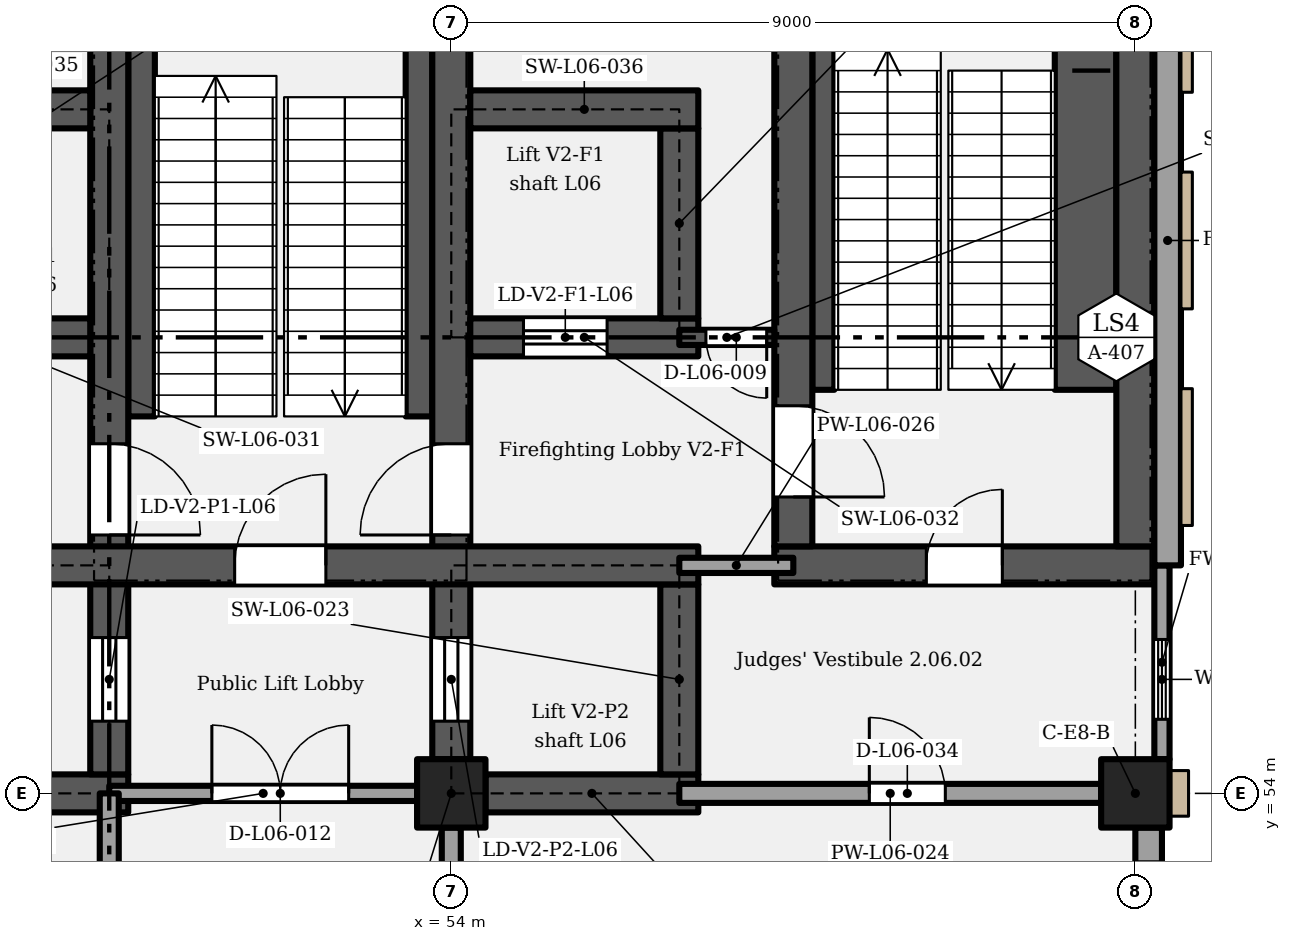
"""IFC4 building model, lengths in metres.
Left out: names, types, materials, properties, quantities, classifications, styles, units other than length and angle.
Written with IfcOpenShell. Run it as: python <this file> out.ifc"""

import sys

from ifc_helpers import new_model, si_unit, direction, frame, frame_2d, origin, origin_2d, place, context, subcontext, project, spatial, rectangle, extrude, element, fill, save


model = new_model("IFC4")
c1 = context("Model", 3, precision=1e-05, world=origin(), true_north=direction((0.0, 1.0)))
c2 = subcontext(c1, "Body", "Model", "MODEL_VIEW")
j1 = project(units=[si_unit("LENGTHUNIT", "METRE"), si_unit("PLANEANGLEUNIT", "RADIAN")], contexts=[c1])
p1 = place(None, origin())
s1 = spatial("IfcSite", under=j1, at=p1, CompositionType="ELEMENT")
p2 = place(p1, origin())
s2 = spatial("IfcBuilding", under=s1, at=p2, CompositionType="ELEMENT")
p3 = place(p2, frame((0.0, 0.0, 33.6)))
s3 = spatial("IfcBuildingStorey", under=s2, at=p3, CompositionType="ELEMENT", Elevation=33.6)
for number, where, z_axis, x_axis in (
    (1, (54.0, 54.0, 0.0), (0.0, 0.0, 1.0), (1.0, 0.0, 0.0)),
    (2, (63.0, 54.0, 0.0), (0.0, 0.0, 1.0), (1.0, 0.0, 0.0)),
):
    element("IfcColumn", number, at=place(p3, frame(where, z_axis=z_axis, x_axis=x_axis)), inside=s3, PredefinedType="COLUMN", context=c2, shape_type="SweptSolid", body=[
        extrude(rectangle(XDim=0.9, YDim=0.9, at=origin_2d()), origin(), (0.0, 0.0, 1.0), 5.4),
    ])
p4 = place(p3, frame((46.25, 54.0, 0.0), z_axis=(0.0, 0.0, 1.0), x_axis=(1.0, 0.0, 0.0)))
e3 = element("IfcWall", 3, at=p4, inside=s3, PredefinedType="SHEAR", context=c2, shape_type="SweptSolid", body=[
    extrude(rectangle(XDim=3.5, YDim=0.5, at=frame_2d((1.75, 0.0))), origin(), (0.0, 0.0, 1.0), 5.15),
])
p5 = place(p3, frame((54.45, 54.0, 0.0), z_axis=(0.0, 0.0, 1.0), x_axis=(1.0, 0.0, 0.0)))
e4 = element("IfcWall", 4, at=p5, inside=s3, PredefinedType="SHEAR", context=c2, shape_type="SweptSolid", body=[
    extrude(rectangle(XDim=2.8, YDim=0.5, at=frame_2d((1.4, 0.0))), origin(), (0.0, 0.0, 1.0), 5.15),
])
p6 = place(p3, frame((49.5, 54.25, 0.0), z_axis=(0.0, 0.0, 1.0), x_axis=(0.0, 1.0, 0.0)))
e5 = element("IfcWall", 5, at=p6, inside=s3, PredefinedType="SHEAR", context=c2, shape_type="SweptSolid", body=[
    extrude(rectangle(XDim=11.5, YDim=0.5, at=frame_2d((5.75, 0.0))), origin(), (0.0, 0.0, 1.0), 5.15),
])
p7 = place(p6, frame((0.7, 0.0, 0.0)))
e6 = element("IfcOpeningElement", 6, at=p7, cuts=e5, PredefinedType="OPENING", context=c2, shape_type="SweptSolid", body=[
    extrude(rectangle(XDim=1.1, YDim=2.1, at=frame_2d((0.55, 1.05))), frame((0.0, 0.26, 0.0), z_axis=(0.0, -1.0, 0.0), x_axis=(1.0, 0.0, 0.0)), (0.0, 0.0, 1.0), 0.52),
])
p8 = place(p6, frame((4.35, 0.0, 0.0), z_axis=(0.0, 0.0, 1.0), x_axis=(-1.0, 0.0, 0.0)))
e7 = element("IfcOpeningElement", 7, at=p8, cuts=e5, PredefinedType="OPENING", context=c2, shape_type="SweptSolid", body=[
    extrude(rectangle(XDim=1.2, YDim=2.1, at=frame_2d((0.6, 1.05))), frame((0.0, 0.26, 0.0), z_axis=(0.0, -1.0, 0.0), x_axis=(1.0, 0.0, 0.0)), (0.0, 0.0, 1.0), 0.52),
])
p9 = place(p3, frame((57.0, 54.25, 0.0), z_axis=(0.0, 0.0, 1.0), x_axis=(0.0, 1.0, 0.0)))
e8 = element("IfcWall", 8, at=p9, inside=s3, PredefinedType="SHEAR", context=c2, shape_type="SweptSolid", body=[
    extrude(rectangle(XDim=2.5, YDim=0.5, at=frame_2d((1.25, 0.0))), origin(), (0.0, 0.0, 1.0), 5.15),
])
p10 = place(p3, frame((54.0, 54.45, 0.0), z_axis=(0.0, 0.0, 1.0), x_axis=(0.0, 1.0, 0.0)))
e9 = element("IfcWall", 9, at=p10, inside=s3, PredefinedType="SHEAR", context=c2, shape_type="SweptSolid", body=[
    extrude(rectangle(XDim=11.1, YDim=0.5, at=frame_2d((5.55, 0.0))), origin(), (0.0, 0.0, 1.0), 5.15),
])
p11 = place(p10, frame((0.5, 0.0, 0.0)))
e10 = element("IfcOpeningElement", 10, at=p11, cuts=e9, PredefinedType="OPENING", context=c2, shape_type="SweptSolid", body=[
    extrude(rectangle(XDim=1.1, YDim=2.1, at=frame_2d((0.55, 1.05))), frame((0.0, 0.26, 0.0), z_axis=(0.0, -1.0, 0.0), x_axis=(1.0, 0.0, 0.0)), (0.0, 0.0, 1.0), 0.52),
])
p12 = place(p10, frame((2.95, 0.0, 0.0)))
e11 = element("IfcOpeningElement", 11, at=p12, cuts=e9, PredefinedType="OPENING", context=c2, shape_type="SweptSolid", body=[
    extrude(rectangle(XDim=1.2, YDim=2.1, at=frame_2d((0.6, 1.05))), frame((0.0, 0.26, 0.0), z_axis=(0.0, -1.0, 0.0), x_axis=(1.0, 0.0, 0.0)), (0.0, 0.0, 1.0), 0.52),
])
p13 = place(p3, frame((46.25, 57.0, 0.0), z_axis=(0.0, 0.0, 1.0), x_axis=(1.0, 0.0, 0.0)))
e12 = element("IfcWall", 12, at=p13, inside=s3, PredefinedType="SHEAR", context=c2, shape_type="SweptSolid", body=[
    extrude(rectangle(XDim=11.0, YDim=0.5, at=frame_2d((5.5, 0.0))), origin(), (0.0, 0.0, 1.0), 5.15),
])
p14 = place(p13, frame((4.9, 0.0, 0.0)))
e13 = element("IfcOpeningElement", 13, at=p14, cuts=e12, PredefinedType="OPENING", context=c2, shape_type="SweptSolid", body=[
    extrude(rectangle(XDim=1.2, YDim=2.1, at=frame_2d((0.6, 1.05))), frame((0.0, 0.26, 0.0), z_axis=(0.0, -1.0, 0.0), x_axis=(1.0, 0.0, 0.0)), (0.0, 0.0, 1.0), 0.52),
])
p15 = place(p3, frame((58.25, 57.0, 0.0), z_axis=(0.0, 0.0, 1.0), x_axis=(1.0, 0.0, 0.0)))
e14 = element("IfcWall", 14, at=p15, inside=s3, PredefinedType="SHEAR", context=c2, shape_type="SweptSolid", body=[
    extrude(rectangle(XDim=5.0, YDim=0.5, at=frame_2d((2.5, 0.0))), origin(), (0.0, 0.0, 1.0), 5.15),
])
p16 = place(p15, frame((2.0, 0.0, 0.0)))
e15 = element("IfcOpeningElement", 15, at=p16, cuts=e14, PredefinedType="OPENING", context=c2, shape_type="SweptSolid", body=[
    extrude(rectangle(XDim=1.0, YDim=2.1, at=frame_2d((0.5, 1.05))), frame((0.0, 0.26, 0.0), z_axis=(0.0, -1.0, 0.0), x_axis=(1.0, 0.0, 0.0)), (0.0, 0.0, 1.0), 0.52),
])
p17 = place(p3, frame((58.5, 57.25, 0.0), z_axis=(0.0, 0.0, 1.0), x_axis=(0.0, 1.0, 0.0)))
e16 = element("IfcWall", 16, at=p17, inside=s3, PredefinedType="SHEAR", context=c2, shape_type="SweptSolid", body=[
    extrude(rectangle(XDim=8.5, YDim=0.5, at=frame_2d((4.25, 0.0))), origin(), (0.0, 0.0, 1.0), 5.15),
])
p18 = place(p17, frame((1.85, 0.0, 0.0), z_axis=(0.0, 0.0, 1.0), x_axis=(-1.0, 0.0, 0.0)))
e17 = element("IfcOpeningElement", 17, at=p18, cuts=e16, PredefinedType="OPENING", context=c2, shape_type="SweptSolid", body=[
    extrude(rectangle(XDim=1.2, YDim=2.1, at=frame_2d((0.6, 1.05))), frame((0.0, 0.26, 0.0), z_axis=(0.0, -1.0, 0.0), x_axis=(1.0, 0.0, 0.0)), (0.0, 0.0, 1.0), 0.52),
])
p19 = place(p3, frame((63.0, 57.25, 0.0), z_axis=(0.0, 0.0, 1.0), x_axis=(0.0, 1.0, 0.0)))
e18 = element("IfcWall", 18, at=p19, inside=s3, PredefinedType="SHEAR", context=c2, shape_type="SweptSolid", body=[
    extrude(rectangle(XDim=8.3, YDim=0.5, at=frame_2d((4.15, 0.0))), origin(), (0.0, 0.0, 1.0), 5.15),
])
p20 = place(p3, frame((46.25, 60.0, 0.0), z_axis=(0.0, 0.0, 1.0), x_axis=(1.0, 0.0, 0.0)))
e19 = element("IfcWall", 19, at=p20, inside=s3, PredefinedType="SHEAR", context=c2, shape_type="SweptSolid", body=[
    extrude(rectangle(XDim=3.0, YDim=0.5, at=frame_2d((1.5, 0.0))), origin(), (0.0, 0.0, 1.0), 5.15),
])
p21 = place(p3, frame((54.25, 60.0, 0.0), z_axis=(0.0, 0.0, 1.0), x_axis=(1.0, 0.0, 0.0)))
e20 = element("IfcWall", 20, at=p21, inside=s3, PredefinedType="SHEAR", context=c2, shape_type="SweptSolid", body=[
    extrude(rectangle(XDim=3.0, YDim=0.5, at=frame_2d((1.5, 0.0))), origin(), (0.0, 0.0, 1.0), 5.15),
])
p22 = place(p21, frame((0.7, 0.0, 0.0)))
e21 = element("IfcOpeningElement", 21, at=p22, cuts=e20, PredefinedType="OPENING", context=c2, shape_type="SweptSolid", body=[
    extrude(rectangle(XDim=1.1, YDim=2.1, at=frame_2d((0.55, 1.05))), frame((0.0, 0.26, 0.0), z_axis=(0.0, -1.0, 0.0), x_axis=(1.0, 0.0, 0.0)), (0.0, 0.0, 1.0), 0.52),
])
p23 = place(p3, frame((57.0, 60.25, 0.0), z_axis=(0.0, 0.0, 1.0), x_axis=(0.0, 1.0, 0.0)))
e22 = element("IfcWall", 22, at=p23, inside=s3, PredefinedType="SHEAR", context=c2, shape_type="SweptSolid", body=[
    extrude(rectangle(XDim=2.5, YDim=0.5, at=frame_2d((1.25, 0.0))), origin(), (0.0, 0.0, 1.0), 5.15),
])
for number, where, z_axis, x_axis in (
    (23, (46.25, 63.0, 0.0), (0.0, 0.0, 1.0), (1.0, 0.0, 0.0)),
    (24, (54.25, 63.0, 0.0), (0.0, 0.0, 1.0), (1.0, 0.0, 0.0)),
):
    element("IfcWall", number, at=place(p3, frame(where, z_axis=z_axis, x_axis=x_axis)), inside=s3, PredefinedType="SHEAR", context=c2, shape_type="SweptSolid", body=[
        extrude(rectangle(XDim=3.0, YDim=0.5, at=frame_2d((1.5, 0.0))), origin(), (0.0, 0.0, 1.0), 5.15),
    ])
p24 = place(p3, frame((63.175, 42.0, 0.0), z_axis=(0.0, 0.0, 1.0), x_axis=(0.0, 1.0, 0.0)))
e25 = element("IfcWall", 25, at=p24, inside=s3, PredefinedType="SOLIDWALL", context=c2, shape_type="SweptSolid", body=[
    extrude(rectangle(XDim=11.55, YDim=0.35, at=frame_2d((5.775, 0.0))), origin(), (0.0, 0.0, 1.0), 5.15),
])
p25 = place(p24, frame((3.0, 0.0, 1.05)))
e26 = element("IfcOpeningElement", 26, at=p25, cuts=e25, PredefinedType="OPENING", context=c2, shape_type="SweptSolid", body=[
    extrude(rectangle(XDim=1.5, YDim=3.5, at=frame_2d((0.75, 1.75))), frame((0.0, 0.185, 0.0), z_axis=(0.0, -1.0, 0.0), x_axis=(1.0, 0.0, 0.0)), (0.0, 0.0, 1.0), 0.37),
])
p26 = place(p24, frame((6.3, 0.0, 1.05)))
e27 = element("IfcOpeningElement", 27, at=p26, cuts=e25, PredefinedType="OPENING", context=c2, shape_type="SweptSolid", body=[
    extrude(rectangle(XDim=1.5, YDim=3.5, at=frame_2d((0.75, 1.75))), frame((0.0, 0.185, 0.0), z_axis=(0.0, -1.0, 0.0), x_axis=(1.0, 0.0, 0.0)), (0.0, 0.0, 1.0), 0.37),
])
p27 = place(p24, frame((9.6, 0.0, 1.05)))
e28 = element("IfcOpeningElement", 28, at=p27, cuts=e25, PredefinedType="OPENING", context=c2, shape_type="SweptSolid", body=[
    extrude(rectangle(XDim=1.5, YDim=3.5, at=frame_2d((0.75, 1.75))), frame((0.0, 0.185, 0.0), z_axis=(0.0, -1.0, 0.0), x_axis=(1.0, 0.0, 0.0)), (0.0, 0.0, 1.0), 0.37),
])
p28 = place(p3, frame((63.35, 54.45, 0.0), z_axis=(0.0, 0.0, 1.0), x_axis=(0.0, 1.0, 0.0)))
e29 = element("IfcWall", 29, at=p28, inside=s3, PredefinedType="SOLIDWALL", context=c2, shape_type="SweptSolid", body=[
    extrude(rectangle(XDim=2.55, YDim=0.2, at=frame_2d((1.275, 0.0))), origin(), (0.0, 0.0, 1.0), 5.15),
])
p29 = place(p28, frame((0.525, 0.0, 1.05)))
e30 = element("IfcOpeningElement", 30, at=p29, cuts=e29, PredefinedType="OPENING", context=c2, shape_type="SweptSolid", body=[
    extrude(rectangle(XDim=1.05, YDim=2.4, at=frame_2d((0.525, 1.2))), frame((0.0, 0.11, 0.0), z_axis=(0.0, -1.0, 0.0), x_axis=(1.0, 0.0, 0.0)), (0.0, 0.0, 1.0), 0.22),
])
p30 = place(p3, frame((63.425, 57.0, 0.0), z_axis=(0.0, 0.0, 1.0), x_axis=(0.0, 1.0, 0.0)))
e31 = element("IfcWall", 31, at=p30, inside=s3, PredefinedType="SOLIDWALL", context=c2, shape_type="SweptSolid", body=[
    extrude(rectangle(XDim=8.55, YDim=0.35, at=frame_2d((4.275, 0.0))), origin(), (0.0, 0.0, 1.0), 5.15),
])
p31 = place(p3, frame((49.5, 54.0, 0.0), z_axis=(0.0, 0.0, 1.0), x_axis=(1.0, 0.0, 0.0)))
e32 = element("IfcWall", 32, at=p31, inside=s3, PredefinedType="PARTITIONING", context=c2, shape_type="SweptSolid", body=[
    extrude(rectangle(XDim=4.05, YDim=0.2, at=frame_2d((2.025, 0.0))), origin(), (0.0, 0.0, 1.0), 4.4),
])
p32 = place(p31, frame((1.35, 0.0, 0.0)))
e33 = element("IfcOpeningElement", 33, at=p32, cuts=e32, PredefinedType="OPENING", context=c2, shape_type="SweptSolid", body=[
    extrude(rectangle(XDim=1.8, YDim=2.1, at=frame_2d((0.9, 1.05))), frame((0.0, 0.11, 0.0), z_axis=(0.0, -1.0, 0.0), x_axis=(1.0, 0.0, 0.0)), (0.0, 0.0, 1.0), 0.22),
])
p33 = place(p3, frame((57.0, 54.0, 0.0), z_axis=(0.0, 0.0, 1.0), x_axis=(1.0, 0.0, 0.0)))
e34 = element("IfcWall", 34, at=p33, inside=s3, PredefinedType="PARTITIONING", context=c2, shape_type="SweptSolid", body=[
    extrude(rectangle(XDim=5.55, YDim=0.25, at=frame_2d((2.775, 0.0))), origin(), (0.0, 0.0, 1.0), 4.4),
])
p34 = place(p33, frame((2.5, 0.0, 0.0)))
e35 = element("IfcOpeningElement", 35, at=p34, cuts=e34, PredefinedType="OPENING", context=c2, shape_type="SweptSolid", body=[
    extrude(rectangle(XDim=1.0, YDim=2.1, at=frame_2d((0.5, 1.05))), frame((0.0, 0.135, 0.0), z_axis=(0.0, -1.0, 0.0), x_axis=(1.0, 0.0, 0.0)), (0.0, 0.0, 1.0), 0.27),
])
p35 = place(p3, frame((57.0, 57.0, 0.0), z_axis=(0.0, 0.0, 1.0), x_axis=(1.0, 0.0, 0.0)))
e36 = element("IfcWall", 36, at=p35, inside=s3, PredefinedType="PARTITIONING", context=c2, shape_type="SweptSolid", body=[
    extrude(rectangle(XDim=1.5, YDim=0.2, at=frame_2d((0.75, 0.0))), origin(), (0.0, 0.0, 1.0), 5.15),
])
p36 = place(p3, frame((57.0, 60.0, 0.0), z_axis=(0.0, 0.0, 1.0), x_axis=(1.0, 0.0, 0.0)))
e37 = element("IfcWall", 37, at=p36, inside=s3, PredefinedType="SHEAR", context=c2, shape_type="SweptSolid", body=[
    extrude(rectangle(XDim=1.25, YDim=0.2, at=frame_2d((0.625, 0.0))), origin(), (0.0, 0.0, 1.0), 5.15),
])
p37 = place(p36, frame((1.15, 0.0, 0.0), z_axis=(0.0, 0.0, 1.0), x_axis=(-1.0, 0.0, 0.0)))
e38 = element("IfcOpeningElement", 38, at=p37, cuts=e37, PredefinedType="OPENING", context=c2, shape_type="SweptSolid", body=[
    extrude(rectangle(XDim=0.8, YDim=2.0, at=frame_2d((0.4, 1.0))), frame((0.0, 0.11, 0.0), z_axis=(0.0, -1.0, 0.0), x_axis=(1.0, 0.0, 0.0)), (0.0, 0.0, 1.0), 0.22),
])
p38 = place(p3, frame((49.5, 43.5, 0.0), z_axis=(0.0, 0.0, 1.0), x_axis=(0.0, 1.0, 0.0)))
e39 = element("IfcWall", 39, at=p38, inside=s3, PredefinedType="PARTITIONING", context=c2, shape_type="SweptSolid", body=[
    extrude(rectangle(XDim=10.5, YDim=0.25, at=frame_2d((5.25, 0.0))), origin(), (0.0, 0.0, 1.0), 5.15),
])
p39 = place(p38, frame((0.6, 0.0, 0.0)))
e40 = element("IfcOpeningElement", 40, at=p39, cuts=e39, PredefinedType="OPENING", context=c2, shape_type="SweptSolid", body=[
    extrude(rectangle(XDim=1.8, YDim=2.4, at=frame_2d((0.9, 1.2))), frame((0.0, 0.135, 0.0), z_axis=(0.0, -1.0, 0.0), x_axis=(1.0, 0.0, 0.0)), (0.0, 0.0, 1.0), 0.27),
])
p40 = place(p38, frame((7.1, 0.0, 0.0)))
e41 = element("IfcOpeningElement", 41, at=p40, cuts=e39, PredefinedType="OPENING", context=c2, shape_type="SweptSolid", body=[
    extrude(rectangle(XDim=1.8, YDim=2.4, at=frame_2d((0.9, 1.2))), frame((0.0, 0.135, 0.0), z_axis=(0.0, -1.0, 0.0), x_axis=(1.0, 0.0, 0.0)), (0.0, 0.0, 1.0), 0.27),
])
p41 = place(p3, frame((54.0, 42.0, 0.0), z_axis=(0.0, 0.0, 1.0), x_axis=(0.0, 1.0, 0.0)))
e42 = element("IfcWall", 42, at=p41, inside=s3, PredefinedType="PARTITIONING", context=c2, shape_type="SweptSolid", body=[
    extrude(rectangle(XDim=11.55, YDim=0.25, at=frame_2d((5.775, 0.0))), origin(), (0.0, 0.0, 1.0), 4.2),
])
p42 = place(p41, frame((3.0, 0.0, 0.0), z_axis=(0.0, 0.0, 1.0), x_axis=(-1.0, 0.0, 0.0)))
e43 = element("IfcOpeningElement", 43, at=p42, cuts=e42, PredefinedType="OPENING", context=c2, shape_type="SweptSolid", body=[
    extrude(rectangle(XDim=1.8, YDim=2.4, at=frame_2d((0.9, 1.2))), frame((0.0, 0.135, 0.0), z_axis=(0.0, -1.0, 0.0), x_axis=(1.0, 0.0, 0.0)), (0.0, 0.0, 1.0), 0.27),
])
p43 = place(p41, frame((10.4, 0.0, 0.0), z_axis=(0.0, 0.0, 1.0), x_axis=(-1.0, 0.0, 0.0)))
e44 = element("IfcOpeningElement", 44, at=p43, cuts=e42, PredefinedType="OPENING", context=c2, shape_type="SweptSolid", body=[
    extrude(rectangle(XDim=1.8, YDim=2.4, at=frame_2d((0.9, 1.2))), frame((0.0, 0.135, 0.0), z_axis=(0.0, -1.0, 0.0), x_axis=(1.0, 0.0, 0.0)), (0.0, 0.0, 1.0), 0.27),
])
p44 = place(p3, frame((49.925, 58.96, 0.0), z_axis=(0.0, 0.0, 1.0), x_axis=(0.0, 1.0, 0.0)))
e45 = element("IfcWall", 45, at=p44, inside=s3, PredefinedType="SHEAR", context=c2, shape_type="SweptSolid", body=[
    extrude(rectangle(XDim=6.79, YDim=0.35, at=frame_2d((3.395, 0.0))), origin(), (0.0, 0.0, 1.0), 2.587),
])
p45 = place(p3, frame((53.575, 58.96, 0.0), z_axis=(0.0, 0.0, 1.0), x_axis=(0.0, 1.0, 0.0)))
e46 = element("IfcWall", 46, at=p45, inside=s3, PredefinedType="SHEAR", context=c2, shape_type="SweptSolid", body=[
    extrude(rectangle(XDim=6.79, YDim=0.35, at=frame_2d((3.395, 0.0))), origin(), (0.0, 0.0, 1.0), 5.15),
])
p46 = place(p3, frame((58.895, 59.31, 0.0), z_axis=(0.0, 0.0, 1.0), x_axis=(0.0, 1.0, 0.0)))
e47 = element("IfcWall", 47, at=p46, inside=s3, PredefinedType="SHEAR", context=c2, shape_type="SweptSolid", body=[
    extrude(rectangle(XDim=6.44, YDim=0.29, at=frame_2d((3.22, 0.0))), origin(), (0.0, 0.0, 1.0), 2.587),
])
p47 = place(p3, frame((62.345, 59.31, 0.0), z_axis=(0.0, 0.0, 1.0), x_axis=(0.0, 1.0, 0.0)))
e48 = element("IfcWall", 48, at=p47, inside=s3, PredefinedType="SHEAR", context=c2, shape_type="SweptSolid", body=[
    extrude(rectangle(XDim=6.19, YDim=0.81, at=frame_2d((3.095, 0.0))), origin(), (0.0, 0.0, 1.0), 2.587),
])
p48 = place(p29, origin())
e49 = element("IfcWindow", 49, at=p48, inside=s3, PartitioningType="SINGLE_PANEL", PredefinedType="WINDOW", context=c2, shape_type="SweptSolid", body=[
    extrude(rectangle(XDim=1.05, YDim=2.4, at=frame_2d((0.525, 1.2))), frame((0.0, 0.03, 0.0), z_axis=(0.0, -1.0, 0.0), x_axis=(1.0, 0.0, 0.0)), (0.0, 0.0, 1.0), 0.06),
])
fill(e30, e49)
p49 = place(p7, origin())
e50 = element("IfcDoor", 50, at=p49, inside=s3, OperationType="SLIDING_TO_LEFT", PredefinedType="DOOR", context=c2, shape_type="SweptSolid", body=[
    extrude(rectangle(XDim=1.1, YDim=2.1, at=frame_2d((0.55, 1.05))), frame((0.0, 0.025, 0.0), z_axis=(0.0, -1.0, 0.0), x_axis=(1.0, 0.0, 0.0)), (0.0, 0.0, 1.0), 0.05),
])
fill(e6, e50)
p50 = place(p11, origin())
e51 = element("IfcDoor", 51, at=p50, inside=s3, OperationType="SLIDING_TO_LEFT", PredefinedType="DOOR", context=c2, shape_type="SweptSolid", body=[
    extrude(rectangle(XDim=1.1, YDim=2.1, at=frame_2d((0.55, 1.05))), frame((0.0, 0.025, 0.0), z_axis=(0.0, -1.0, 0.0), x_axis=(1.0, 0.0, 0.0)), (0.0, 0.0, 1.0), 0.05),
])
fill(e10, e51)
p51 = place(p14, origin())
e52 = element("IfcDoor", 52, at=p51, inside=s3, OperationType="SINGLE_SWING_RIGHT", PredefinedType="DOOR", context=c2, shape_type="SweptSolid", body=[
    extrude(rectangle(XDim=1.2, YDim=2.1, at=frame_2d((0.6, 1.05))), frame((0.0, 0.025, 0.0), z_axis=(0.0, -1.0, 0.0), x_axis=(1.0, 0.0, 0.0)), (0.0, 0.0, 1.0), 0.05),
])
fill(e13, e52)
p52 = place(p22, origin())
e53 = element("IfcDoor", 53, at=p52, inside=s3, OperationType="SLIDING_TO_LEFT", PredefinedType="DOOR", context=c2, shape_type="SweptSolid", body=[
    extrude(rectangle(XDim=1.1, YDim=2.1, at=frame_2d((0.55, 1.05))), frame((0.0, 0.025, 0.0), z_axis=(0.0, -1.0, 0.0), x_axis=(1.0, 0.0, 0.0)), (0.0, 0.0, 1.0), 0.05),
])
fill(e21, e53)
p53 = place(p12, origin())
e54 = element("IfcDoor", 54, at=p53, inside=s3, OperationType="SINGLE_SWING_LEFT", PredefinedType="DOOR", context=c2, shape_type="SweptSolid", body=[
    extrude(rectangle(XDim=1.2, YDim=2.1, at=frame_2d((0.6, 1.05))), frame((0.0, 0.025, 0.0), z_axis=(0.0, -1.0, 0.0), x_axis=(1.0, 0.0, 0.0)), (0.0, 0.0, 1.0), 0.05),
])
fill(e11, e54)
p54 = place(p18, origin())
e55 = element("IfcDoor", 55, at=p54, inside=s3, OperationType="SINGLE_SWING_RIGHT", PredefinedType="DOOR", context=c2, shape_type="SweptSolid", body=[
    extrude(rectangle(XDim=1.2, YDim=2.1, at=frame_2d((0.6, 1.05))), frame((0.0, 0.025, 0.0), z_axis=(0.0, -1.0, 0.0), x_axis=(1.0, 0.0, 0.0)), (0.0, 0.0, 1.0), 0.05),
])
fill(e17, e55)
p55 = place(p37, origin())
e56 = element("IfcDoor", 56, at=p55, inside=s3, OperationType="SINGLE_SWING_LEFT", PredefinedType="DOOR", context=c2, shape_type="SweptSolid", body=[
    extrude(rectangle(XDim=0.8, YDim=2.0, at=frame_2d((0.4, 1.0))), frame((0.0, 0.025, 0.0), z_axis=(0.0, -1.0, 0.0), x_axis=(1.0, 0.0, 0.0)), (0.0, 0.0, 1.0), 0.05),
])
fill(e38, e56)
p56 = place(p8, origin())
e57 = element("IfcDoor", 57, at=p56, inside=s3, OperationType="SINGLE_SWING_RIGHT", PredefinedType="DOOR", context=c2, shape_type="SweptSolid", body=[
    extrude(rectangle(XDim=1.2, YDim=2.1, at=frame_2d((0.6, 1.05))), frame((0.0, 0.025, 0.0), z_axis=(0.0, -1.0, 0.0), x_axis=(1.0, 0.0, 0.0)), (0.0, 0.0, 1.0), 0.05),
])
fill(e7, e57)
p57 = place(p32, origin())
e58 = element("IfcDoor", 58, at=p57, inside=s3, OperationType="DOUBLE_DOOR_SINGLE_SWING", PredefinedType="DOOR", context=c2, shape_type="SweptSolid", body=[
    extrude(rectangle(XDim=1.8, YDim=2.1, at=frame_2d((0.9, 1.05))), frame((0.0, 0.025, 0.0), z_axis=(0.0, -1.0, 0.0), x_axis=(1.0, 0.0, 0.0)), (0.0, 0.0, 1.0), 0.05),
])
fill(e33, e58)
p58 = place(p16, origin())
e59 = element("IfcDoor", 59, at=p58, inside=s3, OperationType="SINGLE_SWING_RIGHT", PredefinedType="DOOR", context=c2, shape_type="SweptSolid", body=[
    extrude(rectangle(XDim=1.0, YDim=2.1, at=frame_2d((0.5, 1.05))), frame((0.0, 0.025, 0.0), z_axis=(0.0, -1.0, 0.0), x_axis=(1.0, 0.0, 0.0)), (0.0, 0.0, 1.0), 0.05),
])
fill(e15, e59)
p59 = place(p34, origin())
e60 = element("IfcDoor", 60, at=p59, inside=s3, OperationType="SINGLE_SWING_LEFT", PredefinedType="DOOR", context=c2, shape_type="SweptSolid", body=[
    extrude(rectangle(XDim=1.0, YDim=2.1, at=frame_2d((0.5, 1.05))), frame((0.0, 0.025, 0.0), z_axis=(0.0, -1.0, 0.0), x_axis=(1.0, 0.0, 0.0)), (0.0, 0.0, 1.0), 0.05),
])
fill(e35, e60)
save(model, sys.argv[1])
